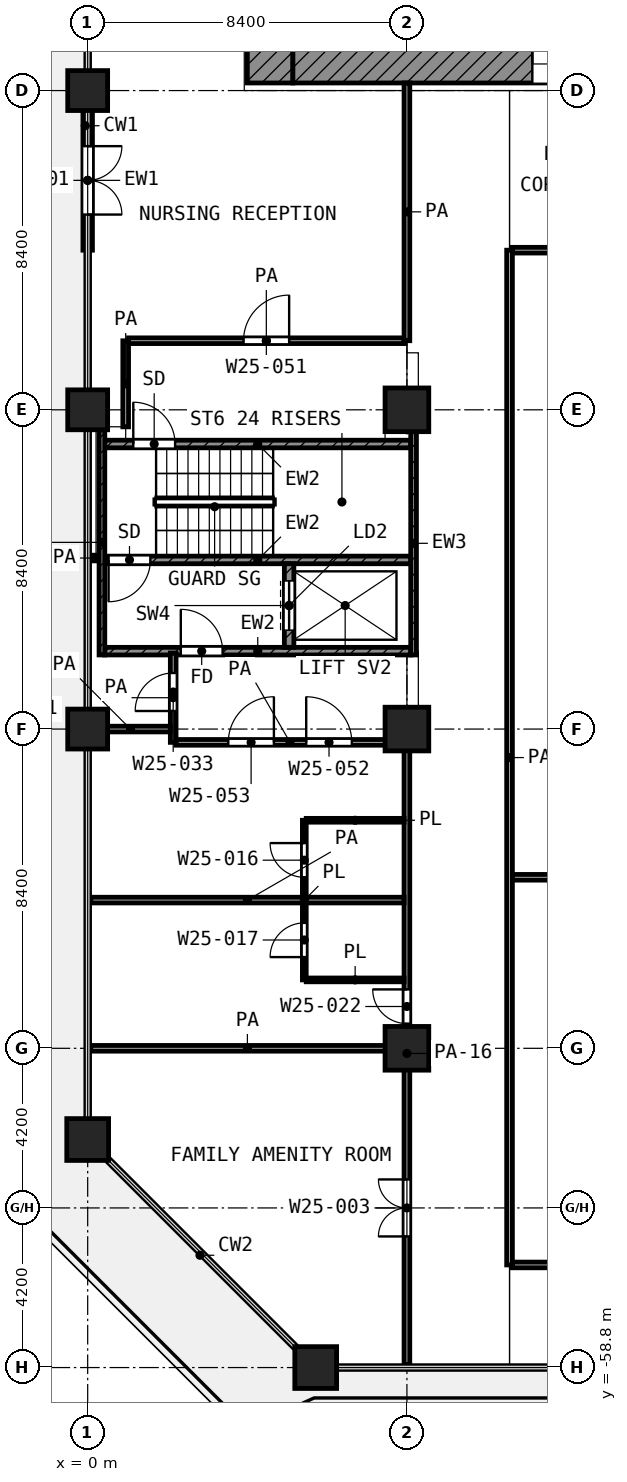
"""IFC4 building model, lengths in metres.
Left out: names, types, materials, properties, quantities, classifications, styles, units other than length and angle.
Written with IfcOpenShell. Run it as: python <this file> out.ifc"""

import sys

from ifc_helpers import new_model, si_unit, direction, frame, frame_2d, origin, origin_2d, place, context, subcontext, project, spatial, rectangle, extrude, element, fill, save


model = new_model("IFC4")
c1 = context("Model", 3, precision=1e-05, world=origin(), true_north=direction((0.0, 1.0)))
c2 = subcontext(c1, "Body", "Model", "MODEL_VIEW")
j1 = project(units=[si_unit("LENGTHUNIT", "METRE"), si_unit("PLANEANGLEUNIT", "RADIAN")], contexts=[c1])
p1 = place(None, origin())
s1 = spatial("IfcSite", under=j1, at=p1, CompositionType="ELEMENT")
p2 = place(p1, origin())
s2 = spatial("IfcBuilding", under=s1, at=p2, CompositionType="ELEMENT")
p3 = place(p2, frame((0.0, 0.0, 111.4)))
s3 = spatial("IfcBuildingStorey", under=s2, at=p3, CompositionType="ELEMENT", Elevation=111.4)
for number, where, z_axis, x_axis in (
    (1, (0.0, -25.2, 0.0), (0.0, 0.0, 1.0), (1.0, 0.0, 0.0)),
    (2, (0.0, -33.6, 0.0), (0.0, 0.0, 1.0), (1.0, 0.0, 0.0)),
):
    element("IfcColumn", number, at=place(p3, frame(where, z_axis=z_axis, x_axis=x_axis)), inside=s3, PredefinedType="COLUMN", context=c2, shape_type="SweptSolid", body=[
        extrude(rectangle(XDim=1.05, YDim=1.05, at=origin_2d()), origin(), (0.0, 0.0, 1.0), 4.2),
    ])
p4 = place(p3, frame((8.4, -33.6, 0.0), z_axis=(0.0, 0.0, 1.0), x_axis=(1.0, 0.0, 0.0)))
e3 = element("IfcColumn", 3, at=p4, inside=s3, PredefinedType="COLUMN", context=c2, shape_type="SweptSolid", body=[
    extrude(rectangle(XDim=1.15, YDim=1.15, at=origin_2d()), origin(), (0.0, 0.0, 1.0), 4.2),
])
p5 = place(p3, frame((0.0, -42.0, 0.0), z_axis=(0.0, 0.0, 1.0), x_axis=(1.0, 0.0, 0.0)))
e4 = element("IfcColumn", 4, at=p5, inside=s3, PredefinedType="COLUMN", context=c2, shape_type="SweptSolid", body=[
    extrude(rectangle(XDim=1.05, YDim=1.05, at=origin_2d()), origin(), (0.0, 0.0, 1.0), 4.2),
])
for number, where, z_axis, x_axis in (
    (5, (8.4, -42.0, 0.0), (0.0, 0.0, 1.0), (1.0, 0.0, 0.0)),
    (6, (8.4, -50.4, 0.0), (0.0, 0.0, 1.0), (1.0, 0.0, 0.0)),
):
    element("IfcColumn", number, at=place(p3, frame(where, z_axis=z_axis, x_axis=x_axis)), inside=s3, PredefinedType="COLUMN", context=c2, shape_type="SweptSolid", body=[
        extrude(rectangle(XDim=1.15, YDim=1.15, at=origin_2d()), origin(), (0.0, 0.0, 1.0), 4.2),
    ])
for number, where, z_axis, x_axis in (
    (7, (0.0, -52.8, 0.0), (0.0, 0.0, 1.0), (1.0, 0.0, 0.0)),
    (8, (6.0, -58.8, 0.0), (0.0, 0.0, 1.0), (1.0, 0.0, 0.0)),
):
    element("IfcColumn", number, at=place(p3, frame(where, z_axis=z_axis, x_axis=x_axis)), inside=s3, PredefinedType="COLUMN", context=c2, shape_type="SweptSolid", body=[
        extrude(rectangle(XDim=1.1, YDim=1.1, at=origin_2d()), origin(), (0.0, 0.0, 1.0), 4.2),
    ])
p6 = place(p3, frame((0.0, -25.725, 0.0), z_axis=(0.0, 0.0, 1.0), x_axis=(0.0, -1.0, 0.0)))
e9 = element("IfcWall", 9, at=p6, inside=s3, PredefinedType="SOLIDWALL", context=c2, shape_type="SweptSolid", body=[
    extrude(rectangle(XDim=3.675, YDim=0.25, at=frame_2d((1.837, 0.0))), origin(), (0.0, 0.0, 1.0), 3.48),
])
p7 = place(p6, frame((0.938, 0.0, 0.0)))
e10 = element("IfcOpeningElement", 10, at=p7, cuts=e9, PredefinedType="OPENING", context=c2, shape_type="SweptSolid", body=[
    extrude(rectangle(XDim=1.8, YDim=2.1, at=frame_2d((0.9, 1.05))), frame((0.0, 0.135, 0.0), z_axis=(0.0, -1.0, 0.0), x_axis=(1.0, 0.0, 0.0)), (0.0, 0.0, 1.0), 0.27),
])
p8 = place(p3, frame((4.8, -25.0, 0.0), z_axis=(0.0, 0.0, 1.0), x_axis=(0.0, 1.0, 0.0)))
e11 = element("IfcWall", 11, at=p8, inside=s3, PredefinedType="SHEAR", context=c2, shape_type="SweptSolid", body=[
    extrude(rectangle(XDim=19.6, YDim=1.2, at=frame_2d((9.8, 0.0))), origin(), (0.0, 0.0, 1.0), 3.6),
])
p9 = place(p8, frame((11.45, 0.0, 0.0)))
e12 = element("IfcOpeningElement", 12, at=p9, cuts=e11, PredefinedType="OPENING", context=c2, shape_type="SweptSolid", body=[
    extrude(rectangle(XDim=1.1, YDim=2.1, at=frame_2d((0.55, 1.05))), frame((0.0, 0.61, 0.0), z_axis=(0.0, -1.0, 0.0), x_axis=(1.0, 0.0, 0.0)), (0.0, 0.0, 1.0), 1.22),
])
p10 = place(p8, frame((2.15, 0.0, 0.0)))
e13 = element("IfcOpeningElement", 13, at=p10, cuts=e11, PredefinedType="OPENING", context=c2, shape_type="SweptSolid", body=[
    extrude(rectangle(XDim=1.1, YDim=2.1, at=frame_2d((0.55, 1.05))), frame((0.0, 0.61, 0.0), z_axis=(0.0, -1.0, 0.0), x_axis=(1.0, 0.0, 0.0)), (0.0, 0.0, 1.0), 1.22),
])
p11 = place(p3, frame((5.4, -24.5, 0.0), z_axis=(0.0, 0.0, 1.0), x_axis=(1.0, 0.0, 0.0)))
e14 = element("IfcWall", 14, at=p11, inside=s3, PredefinedType="SHEAR", context=c2, shape_type="SweptSolid", body=[
    extrude(rectangle(XDim=18.6, YDim=1.0, at=frame_2d((9.3, 0.0))), origin(), (0.0, 0.0, 1.0), 3.6),
])
p12 = place(p11, frame((6.3, 0.0, 0.0)))
e15 = element("IfcOpeningElement", 15, at=p12, cuts=e14, PredefinedType="OPENING", context=c2, shape_type="SweptSolid", body=[
    extrude(rectangle(XDim=1.8, YDim=2.1, at=frame_2d((0.9, 1.05))), frame((0.0, 0.51, 0.0), z_axis=(0.0, -1.0, 0.0), x_axis=(1.0, 0.0, 0.0)), (0.0, 0.0, 1.0), 1.02),
])
p13 = place(p3, frame((0.375, -40.05, 0.0), z_axis=(0.0, 0.0, 1.0), x_axis=(0.0, 1.0, 0.0)))
e16 = element("IfcWall", 16, at=p13, inside=s3, PredefinedType="SHEAR", context=c2, shape_type="SweptSolid", body=[
    extrude(rectangle(XDim=5.925, YDim=0.15, at=frame_2d((2.962, 0.0))), origin(), (0.0, 0.0, 1.0), 3.6),
])
p14 = place(p3, frame((8.575, -40.05, 0.0), z_axis=(0.0, 0.0, 1.0), x_axis=(0.0, 1.0, 0.0)))
e17 = element("IfcWall", 17, at=p14, inside=s3, PredefinedType="SHEAR", context=c2, shape_type="SweptSolid", body=[
    extrude(rectangle(XDim=5.875, YDim=0.15, at=frame_2d((2.938, 0.0))), origin(), (0.0, 0.0, 1.0), 3.6),
])
p15 = place(p3, frame((0.45, -34.5, 0.0), z_axis=(0.0, 0.0, 1.0), x_axis=(1.0, 0.0, 0.0)))
e18 = element("IfcWall", 18, at=p15, inside=s3, PredefinedType="SHEAR", context=c2, shape_type="SweptSolid", body=[
    extrude(rectangle(XDim=8.05, YDim=0.2, at=frame_2d((4.025, 0.0))), origin(), (0.0, 0.0, 1.0), 3.6),
])
p16 = place(p15, frame((0.75, 0.0, 0.0)))
e19 = element("IfcOpeningElement", 19, at=p16, cuts=e18, PredefinedType="OPENING", context=c2, shape_type="SweptSolid", body=[
    extrude(rectangle(XDim=1.1, YDim=2.1, at=frame_2d((0.55, 1.05))), frame((0.0, 0.11, 0.0), z_axis=(0.0, -1.0, 0.0), x_axis=(1.0, 0.0, 0.0)), (0.0, 0.0, 1.0), 0.22),
])
p17 = place(p3, frame((0.45, -37.55, 0.0), z_axis=(0.0, 0.0, 1.0), x_axis=(1.0, 0.0, 0.0)))
e20 = element("IfcWall", 20, at=p17, inside=s3, PredefinedType="SHEAR", context=c2, shape_type="SweptSolid", body=[
    extrude(rectangle(XDim=8.05, YDim=0.2, at=frame_2d((4.025, 0.0))), origin(), (0.0, 0.0, 1.0), 3.6),
])
p18 = place(p17, frame((0.1, 0.0, 0.0)))
e21 = element("IfcOpeningElement", 21, at=p18, cuts=e20, PredefinedType="OPENING", context=c2, shape_type="SweptSolid", body=[
    extrude(rectangle(XDim=1.1, YDim=2.1, at=frame_2d((0.55, 1.05))), frame((0.0, 0.11, 0.0), z_axis=(0.0, -1.0, 0.0), x_axis=(1.0, 0.0, 0.0)), (0.0, 0.0, 1.0), 0.22),
])
p19 = place(p3, frame((0.45, -39.95, 0.0), z_axis=(0.0, 0.0, 1.0), x_axis=(1.0, 0.0, 0.0)))
e22 = element("IfcWall", 22, at=p19, inside=s3, PredefinedType="SHEAR", context=c2, shape_type="SweptSolid", body=[
    extrude(rectangle(XDim=8.05, YDim=0.2, at=frame_2d((4.025, 0.0))), origin(), (0.0, 0.0, 1.0), 3.6),
])
p20 = place(p19, frame((2.0, 0.0, 0.0)))
e23 = element("IfcOpeningElement", 23, at=p20, cuts=e22, PredefinedType="OPENING", context=c2, shape_type="SweptSolid", body=[
    extrude(rectangle(XDim=1.1, YDim=2.1, at=frame_2d((0.55, 1.05))), frame((0.0, 0.11, 0.0), z_axis=(0.0, -1.0, 0.0), x_axis=(1.0, 0.0, 0.0)), (0.0, 0.0, 1.0), 0.22),
])
p21 = place(p3, frame((5.3, -39.85, 0.0), z_axis=(0.0, 0.0, 1.0), x_axis=(0.0, 1.0, 0.0)))
e24 = element("IfcWall", 24, at=p21, inside=s3, PredefinedType="SHEAR", context=c2, shape_type="SweptSolid", body=[
    extrude(rectangle(XDim=2.2, YDim=0.25, at=frame_2d((1.1, 0.0))), origin(), (0.0, 0.0, 1.0), 3.6),
])
p22 = place(p21, frame((0.45, 0.0, 0.0)))
e25 = element("IfcOpeningElement", 25, at=p22, cuts=e24, PredefinedType="OPENING", context=c2, shape_type="SweptSolid", body=[
    extrude(rectangle(XDim=1.3, YDim=2.1, at=frame_2d((0.65, 1.05))), frame((0.0, 0.135, 0.0), z_axis=(0.0, -1.0, 0.0), x_axis=(1.0, 0.0, 0.0)), (0.0, 0.0, 1.0), 0.27),
])
for number, where, z_axis, x_axis in (
    (26, (5.75, -48.6, 0.0), (0.0, 0.0, 1.0), (1.0, 0.0, 0.0)),
    (27, (5.75, -44.4, 0.0), (0.0, 0.0, 1.0), (1.0, 0.0, 0.0)),
):
    element("IfcWall", number, at=place(p3, frame(where, z_axis=z_axis, x_axis=x_axis)), inside=s3, PredefinedType="PARTITIONING", context=c2, shape_type="SweptSolid", body=[
        extrude(rectangle(XDim=2.575, YDim=0.1, at=frame_2d((1.288, 0.0))), origin(), (0.0, 0.0, 1.0), 3.6),
    ])
p23 = place(p3, frame((5.7, -48.6, 0.0), z_axis=(0.0, 0.0, 1.0), x_axis=(0.0, 1.0, 0.0)))
e28 = element("IfcWall", 28, at=p23, inside=s3, PredefinedType="PARTITIONING", context=c2, shape_type="SweptSolid", body=[
    extrude(rectangle(XDim=4.2, YDim=0.1, at=frame_2d((2.1, 0.0))), origin(), (0.0, 0.0, 1.0), 3.6),
])
p24 = place(p23, frame((2.7, 0.0, 0.0)))
e29 = element("IfcOpeningElement", 29, at=p24, cuts=e28, PredefinedType="OPENING", context=c2, shape_type="SweptSolid", body=[
    extrude(rectangle(XDim=0.9, YDim=2.1, at=frame_2d((0.45, 1.05))), frame((0.0, 0.06, 0.0), z_axis=(0.0, -1.0, 0.0), x_axis=(1.0, 0.0, 0.0)), (0.0, 0.0, 1.0), 0.12),
])
p25 = place(p23, frame((0.6, 0.0, 0.0)))
e30 = element("IfcOpeningElement", 30, at=p25, cuts=e28, PredefinedType="OPENING", context=c2, shape_type="SweptSolid", body=[
    extrude(rectangle(XDim=0.9, YDim=2.1, at=frame_2d((0.45, 1.05))), frame((0.0, 0.06, 0.0), z_axis=(0.0, -1.0, 0.0), x_axis=(1.0, 0.0, 0.0)), (0.0, 0.0, 1.0), 0.12),
])
p26 = place(p3, frame((11.175, -56.1, 0.0), z_axis=(0.0, 0.0, 1.0), x_axis=(1.0, 0.0, 0.0)))
e31 = element("IfcWall", 31, at=p26, inside=s3, PredefinedType="PARTITIONING", context=c2, shape_type="SweptSolid", body=[
    extrude(rectangle(XDim=2.85, YDim=0.15, at=frame_2d((1.425, 0.0))), origin(), (0.0, 0.0, 1.0), 3.6),
])
for number, where, z_axis, x_axis in (
    (32, (0.08, -50.4, 0.0), (0.0, 0.0, 1.0), (1.0, 0.0, 0.0)),
    (33, (0.08, -46.5, 0.0), (0.0, 0.0, 1.0), (1.0, 0.0, 0.0)),
):
    element("IfcWall", number, at=place(p3, frame(where, z_axis=z_axis, x_axis=x_axis)), inside=s3, PredefinedType="PARTITIONING", context=c2, shape_type="SweptSolid", body=[
        extrude(rectangle(XDim=8.245, YDim=0.15, at=frame_2d((4.123, 0.0))), origin(), (0.0, 0.0, 1.0), 3.6),
    ])
p27 = place(p3, frame((11.175, -45.9, 0.0), z_axis=(0.0, 0.0, 1.0), x_axis=(1.0, 0.0, 0.0)))
e34 = element("IfcWall", 34, at=p27, inside=s3, PredefinedType="PARTITIONING", context=c2, shape_type="SweptSolid", body=[
    extrude(rectangle(XDim=2.85, YDim=0.15, at=frame_2d((1.425, 0.0))), origin(), (0.0, 0.0, 1.0), 3.6),
])
p28 = place(p3, frame((2.325, -42.35, 0.0), z_axis=(0.0, 0.0, 1.0), x_axis=(1.0, 0.0, 0.0)))
e35 = element("IfcWall", 35, at=p28, inside=s3, PredefinedType="PARTITIONING", context=c2, shape_type="SweptSolid", body=[
    extrude(rectangle(XDim=6.0, YDim=0.15, at=frame_2d((3.0, 0.0))), origin(), (0.0, 0.0, 1.0), 3.6),
])
p29 = place(p28, frame((3.425, 0.0, 0.0)))
e36 = element("IfcOpeningElement", 36, at=p29, cuts=e35, PredefinedType="OPENING", context=c2, shape_type="SweptSolid", body=[
    extrude(rectangle(XDim=1.2, YDim=2.1, at=frame_2d((0.6, 1.05))), frame((0.0, 0.085, 0.0), z_axis=(0.0, -1.0, 0.0), x_axis=(1.0, 0.0, 0.0)), (0.0, 0.0, 1.0), 0.17),
])
p30 = place(p28, frame((1.375, 0.0, 0.0)))
e37 = element("IfcOpeningElement", 37, at=p30, cuts=e35, PredefinedType="OPENING", context=c2, shape_type="SweptSolid", body=[
    extrude(rectangle(XDim=1.2, YDim=2.1, at=frame_2d((0.6, 1.05))), frame((0.0, 0.085, 0.0), z_axis=(0.0, -1.0, 0.0), x_axis=(1.0, 0.0, 0.0)), (0.0, 0.0, 1.0), 0.17),
])
p31 = place(p3, frame((0.08, -42.0, 0.0), z_axis=(0.0, 0.0, 1.0), x_axis=(1.0, 0.0, 0.0)))
e38 = element("IfcWall", 38, at=p31, inside=s3, PredefinedType="PARTITIONING", context=c2, shape_type="SweptSolid", body=[
    extrude(rectangle(XDim=2.095, YDim=0.15, at=frame_2d((1.047, 0.0))), origin(), (0.0, 0.0, 1.0), 3.6),
])
p32 = place(p3, frame((0.08, -37.5, 0.0), z_axis=(0.0, 0.0, 1.0), x_axis=(1.0, 0.0, 0.0)))
e39 = element("IfcWall", 39, at=p32, inside=s3, PredefinedType="PARTITIONING", context=c2, shape_type="SweptSolid", body=[
    extrude(rectangle(XDim=0.19, YDim=0.15, at=frame_2d((0.095, 0.0))), origin(), (0.0, 0.0, 1.0), 3.6),
])
p33 = place(p3, frame((1.076, -31.782, 0.0), z_axis=(0.0, 0.0, 1.0), x_axis=(1.0, 0.0, 0.0)))
e40 = element("IfcWall", 40, at=p33, inside=s3, PredefinedType="PARTITIONING", context=c2, shape_type="SweptSolid", body=[
    extrude(rectangle(XDim=7.249, YDim=0.15, at=frame_2d((3.625, 0.0))), origin(), (0.0, 0.0, 1.0), 3.6),
])
p34 = place(p33, frame((3.025, 0.0, 0.0)))
e41 = element("IfcOpeningElement", 41, at=p34, cuts=e40, PredefinedType="OPENING", context=c2, shape_type="SweptSolid", body=[
    extrude(rectangle(XDim=1.2, YDim=2.1, at=frame_2d((0.6, 1.05))), frame((0.0, 0.085, 0.0), z_axis=(0.0, -1.0, 0.0), x_axis=(1.0, 0.0, 0.0)), (0.0, 0.0, 1.0), 0.17),
])
p35 = place(p3, frame((11.175, -29.4, 0.0), z_axis=(0.0, 0.0, 1.0), x_axis=(1.0, 0.0, 0.0)))
e42 = element("IfcWall", 42, at=p35, inside=s3, PredefinedType="PARTITIONING", context=c2, shape_type="SweptSolid", body=[
    extrude(rectangle(XDim=2.85, YDim=0.15, at=frame_2d((1.425, 0.0))), origin(), (0.0, 0.0, 1.0), 3.6),
])
p36 = place(p3, frame((1.0, -34.048, 0.0), z_axis=(0.0, 0.0, 1.0), x_axis=(0.0, 1.0, 0.0)))
e43 = element("IfcWall", 43, at=p36, inside=s3, PredefinedType="PARTITIONING", context=c2, shape_type="SweptSolid", body=[
    extrude(rectangle(XDim=2.264, YDim=0.15, at=frame_2d((1.132, 0.0))), origin(), (0.0, 0.0, 1.0), 3.6),
])
p37 = place(p3, frame((2.25, -42.35, 0.0), z_axis=(0.0, 0.0, 1.0), x_axis=(0.0, 1.0, 0.0)))
e44 = element("IfcWall", 44, at=p37, inside=s3, PredefinedType="PARTITIONING", context=c2, shape_type="SweptSolid", body=[
    extrude(rectangle(XDim=2.35, YDim=0.15, at=frame_2d((1.175, 0.0))), origin(), (0.0, 0.0, 1.0), 3.6),
])
p38 = place(p37, frame((0.825, 0.0, 0.0)))
e45 = element("IfcOpeningElement", 45, at=p38, cuts=e44, PredefinedType="OPENING", context=c2, shape_type="SweptSolid", body=[
    extrude(rectangle(XDim=1.0, YDim=2.1, at=frame_2d((0.5, 1.05))), frame((0.0, 0.085, 0.0), z_axis=(0.0, -1.0, 0.0), x_axis=(1.0, 0.0, 0.0)), (0.0, 0.0, 1.0), 0.17),
])
p39 = place(p3, frame((8.4, -58.72, 0.0), z_axis=(0.0, 0.0, 1.0), x_axis=(0.0, 1.0, 0.0)))
e46 = element("IfcWall", 46, at=p39, inside=s3, PredefinedType="PARTITIONING", context=c2, shape_type="SweptSolid", body=[
    extrude(rectangle(XDim=16.37, YDim=0.15, at=frame_2d((8.185, 0.0))), origin(), (0.0, 0.0, 1.0), 2.7),
])
p40 = place(p39, frame((8.97, 0.0, 0.0)))
e47 = element("IfcOpeningElement", 47, at=p40, cuts=e46, PredefinedType="OPENING", context=c2, shape_type="SweptSolid", body=[
    extrude(rectangle(XDim=0.9, YDim=2.1, at=frame_2d((0.45, 1.05))), frame((0.0, 0.085, 0.0), z_axis=(0.0, -1.0, 0.0), x_axis=(1.0, 0.0, 0.0)), (0.0, 0.0, 1.0), 0.17),
])
p41 = place(p39, frame((3.37, 0.0, 0.0)))
e48 = element("IfcOpeningElement", 48, at=p41, cuts=e46, PredefinedType="OPENING", context=c2, shape_type="SweptSolid", body=[
    extrude(rectangle(XDim=1.5, YDim=2.1, at=frame_2d((0.75, 1.05))), frame((0.0, 0.085, 0.0), z_axis=(0.0, -1.0, 0.0), x_axis=(1.0, 0.0, 0.0)), (0.0, 0.0, 1.0), 0.17),
])
p42 = place(p3, frame((8.4, -31.782, 0.0), z_axis=(0.0, 0.0, 1.0), x_axis=(0.0, 1.0, 0.0)))
e49 = element("IfcWall", 49, at=p42, inside=s3, PredefinedType="PARTITIONING", context=c2, shape_type="SweptSolid", body=[
    extrude(rectangle(XDim=6.782, YDim=0.15, at=frame_2d((3.391, 0.0))), origin(), (0.0, 0.0, 1.0), 3.6),
])
p43 = place(p3, frame((11.1, -56.1, 0.0), z_axis=(0.0, 0.0, 1.0), x_axis=(0.0, 1.0, 0.0)))
e50 = element("IfcWall", 50, at=p43, inside=s3, PredefinedType="PARTITIONING", context=c2, shape_type="SweptSolid", body=[
    extrude(rectangle(XDim=26.7, YDim=0.15, at=frame_2d((13.35, 0.0))), origin(), (0.0, 0.0, 1.0), 3.6),
])
p44 = place(p7, origin())
e51 = element("IfcDoor", 51, at=p44, inside=s3, OperationType="DOUBLE_DOOR_SINGLE_SWING", PredefinedType="DOOR", context=c2, shape_type="SweptSolid", body=[
    extrude(rectangle(XDim=1.8, YDim=2.1, at=frame_2d((0.9, 1.05))), frame((0.0, 0.025, 0.0), z_axis=(0.0, -1.0, 0.0), x_axis=(1.0, 0.0, 0.0)), (0.0, 0.0, 1.0), 0.05),
])
fill(e10, e51)
p45 = place(p12, origin())
e52 = element("IfcDoor", 52, at=p45, inside=s3, OperationType="DOUBLE_DOOR_SINGLE_SWING", PredefinedType="DOOR", context=c2, shape_type="SweptSolid", body=[
    extrude(rectangle(XDim=1.8, YDim=2.1, at=frame_2d((0.9, 1.05))), frame((0.0, 0.025, 0.0), z_axis=(0.0, -1.0, 0.0), x_axis=(1.0, 0.0, 0.0)), (0.0, 0.0, 1.0), 0.05),
])
fill(e15, e52)
p46 = place(p16, origin())
e53 = element("IfcDoor", 53, at=p46, inside=s3, OperationType="SINGLE_SWING_LEFT", PredefinedType="DOOR", context=c2, shape_type="SweptSolid", body=[
    extrude(rectangle(XDim=1.1, YDim=2.1, at=frame_2d((0.55, 1.05))), frame((0.0, 0.025, 0.0), z_axis=(0.0, -1.0, 0.0), x_axis=(1.0, 0.0, 0.0)), (0.0, 0.0, 1.0), 0.05),
])
fill(e19, e53)
p47 = place(p18, frame((1.1, 0.0, 0.0), z_axis=(0.0, 0.0, 1.0), x_axis=(-1.0, 0.0, 0.0)))
e54 = element("IfcDoor", 54, at=p47, inside=s3, OperationType="SINGLE_SWING_LEFT", PredefinedType="DOOR", context=c2, shape_type="SweptSolid", body=[
    extrude(rectangle(XDim=1.1, YDim=2.1, at=frame_2d((0.55, 1.05))), frame((0.0, 0.025, 0.0), z_axis=(0.0, -1.0, 0.0), x_axis=(1.0, 0.0, 0.0)), (0.0, 0.0, 1.0), 0.05),
])
fill(e21, e54)
p48 = place(p22, origin())
e55 = element("IfcDoor", 55, at=p48, inside=s3, OperationType="DOUBLE_DOOR_SLIDING", PredefinedType="DOOR", context=c2, shape_type="SweptSolid", body=[
    extrude(rectangle(XDim=1.3, YDim=2.1, at=frame_2d((0.65, 1.05))), frame((0.0, 0.025, 0.0), z_axis=(0.0, -1.0, 0.0), x_axis=(1.0, 0.0, 0.0)), (0.0, 0.0, 1.0), 0.05),
])
fill(e25, e55)
p49 = place(p20, origin())
e56 = element("IfcDoor", 56, at=p49, inside=s3, OperationType="SINGLE_SWING_LEFT", PredefinedType="DOOR", context=c2, shape_type="SweptSolid", body=[
    extrude(rectangle(XDim=1.1, YDim=2.1, at=frame_2d((0.55, 1.05))), frame((0.0, 0.025, 0.0), z_axis=(0.0, -1.0, 0.0), x_axis=(1.0, 0.0, 0.0)), (0.0, 0.0, 1.0), 0.05),
])
fill(e23, e56)
p50 = place(p34, origin())
e57 = element("IfcDoor", 57, at=p50, inside=s3, OperationType="SINGLE_SWING_RIGHT", PredefinedType="DOOR", context=c2, shape_type="SweptSolid", body=[
    extrude(rectangle(XDim=1.2, YDim=2.1, at=frame_2d((0.6, 1.05))), frame((0.0, 0.025, 0.0), z_axis=(0.0, -1.0, 0.0), x_axis=(1.0, 0.0, 0.0)), (0.0, 0.0, 1.0), 0.05),
])
fill(e41, e57)
p51 = place(p38, origin())
e58 = element("IfcDoor", 58, at=p51, inside=s3, OperationType="SINGLE_SWING_LEFT", PredefinedType="DOOR", context=c2, shape_type="SweptSolid", body=[
    extrude(rectangle(XDim=1.0, YDim=2.1, at=frame_2d((0.5, 1.05))), frame((0.0, 0.025, 0.0), z_axis=(0.0, -1.0, 0.0), x_axis=(1.0, 0.0, 0.0)), (0.0, 0.0, 1.0), 0.05),
])
fill(e45, e58)
p52 = place(p29, origin())
e59 = element("IfcDoor", 59, at=p52, inside=s3, OperationType="SINGLE_SWING_LEFT", PredefinedType="DOOR", context=c2, shape_type="SweptSolid", body=[
    extrude(rectangle(XDim=1.2, YDim=2.1, at=frame_2d((0.6, 1.05))), frame((0.0, 0.025, 0.0), z_axis=(0.0, -1.0, 0.0), x_axis=(1.0, 0.0, 0.0)), (0.0, 0.0, 1.0), 0.05),
])
fill(e36, e59)
p53 = place(p30, origin())
e60 = element("IfcDoor", 60, at=p53, inside=s3, OperationType="SINGLE_SWING_RIGHT", PredefinedType="DOOR", context=c2, shape_type="SweptSolid", body=[
    extrude(rectangle(XDim=1.2, YDim=2.1, at=frame_2d((0.6, 1.05))), frame((0.0, 0.025, 0.0), z_axis=(0.0, -1.0, 0.0), x_axis=(1.0, 0.0, 0.0)), (0.0, 0.0, 1.0), 0.05),
])
fill(e37, e60)
p54 = place(p24, origin())
e61 = element("IfcDoor", 61, at=p54, inside=s3, OperationType="SINGLE_SWING_RIGHT", PredefinedType="DOOR", context=c2, shape_type="SweptSolid", body=[
    extrude(rectangle(XDim=0.9, YDim=2.1, at=frame_2d((0.45, 1.05))), frame((0.0, 0.025, 0.0), z_axis=(0.0, -1.0, 0.0), x_axis=(1.0, 0.0, 0.0)), (0.0, 0.0, 1.0), 0.05),
])
fill(e29, e61)
p55 = place(p40, origin())
e62 = element("IfcDoor", 62, at=p55, inside=s3, OperationType="SINGLE_SWING_RIGHT", PredefinedType="DOOR", context=c2, shape_type="SweptSolid", body=[
    extrude(rectangle(XDim=0.9, YDim=2.1, at=frame_2d((0.45, 1.05))), frame((0.0, 0.025, 0.0), z_axis=(0.0, -1.0, 0.0), x_axis=(1.0, 0.0, 0.0)), (0.0, 0.0, 1.0), 0.05),
])
fill(e47, e62)
p56 = place(p25, origin())
e63 = element("IfcDoor", 63, at=p56, inside=s3, OperationType="SINGLE_SWING_LEFT", PredefinedType="DOOR", context=c2, shape_type="SweptSolid", body=[
    extrude(rectangle(XDim=0.9, YDim=2.1, at=frame_2d((0.45, 1.05))), frame((0.0, 0.025, 0.0), z_axis=(0.0, -1.0, 0.0), x_axis=(1.0, 0.0, 0.0)), (0.0, 0.0, 1.0), 0.05),
])
fill(e30, e63)
p57 = place(p41, origin())
e64 = element("IfcDoor", 64, at=p57, inside=s3, OperationType="DOUBLE_DOOR_SINGLE_SWING", PredefinedType="DOOR", context=c2, shape_type="SweptSolid", body=[
    extrude(rectangle(XDim=1.5, YDim=2.1, at=frame_2d((0.75, 1.05))), frame((0.0, 0.025, 0.0), z_axis=(0.0, -1.0, 0.0), x_axis=(1.0, 0.0, 0.0)), (0.0, 0.0, 1.0), 0.05),
])
fill(e48, e64)
save(model, sys.argv[1])
